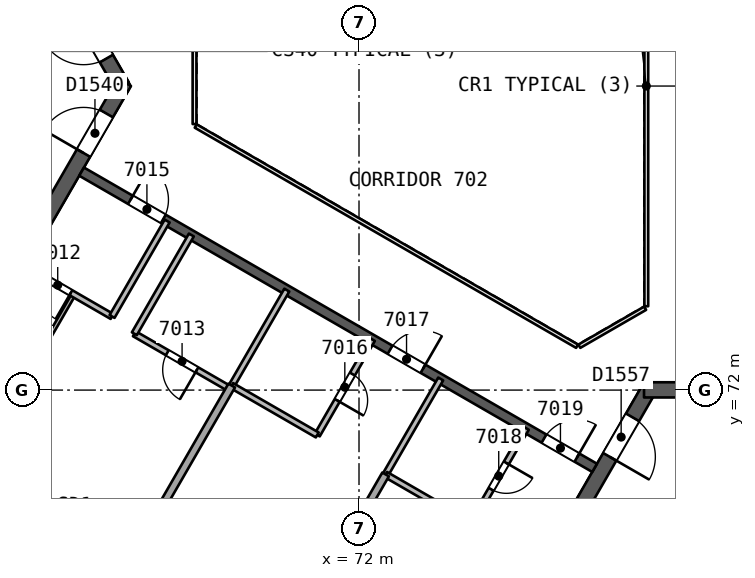
"""IFC4 building model, lengths in metres.
Left out: names, types, materials, properties, quantities, classifications, styles, units other than length and angle.
Written with IfcOpenShell. Run it as: python <this file> out.ifc"""

import sys

from ifc_helpers import new_model, si_unit, direction, frame, frame_2d, origin, place, context, subcontext, project, spatial, rectangle, extrude, element, fill, save


model = new_model("IFC4")
c1 = context("Model", 3, precision=1e-05, world=origin(), true_north=direction((0.0, 1.0)))
c2 = subcontext(c1, "Body", "Model", "MODEL_VIEW")
j1 = project(units=[si_unit("LENGTHUNIT", "METRE"), si_unit("PLANEANGLEUNIT", "RADIAN")], contexts=[c1])
p1 = place(None, origin())
s1 = spatial("IfcSite", under=j1, at=p1, CompositionType="ELEMENT")
p2 = place(p1, origin())
s2 = spatial("IfcBuilding", under=s1, at=p2, CompositionType="ELEMENT")
p3 = place(p2, frame((0.0, 0.0, 284.9)))
s3 = spatial("IfcBuildingStorey", under=s2, at=p3, CompositionType="ELEMENT", Elevation=284.9)
p4 = place(p3, frame((65.769, 80.0, 0.0), z_axis=(0.0, 0.0, 1.0), x_axis=(-0.50000177223, 0.866024380585, 0.0)))
e1 = element("IfcWall", 1, at=p4, inside=s3, PredefinedType="SHEAR", context=c2, shape_type="SweptSolid", body=[
    extrude(rectangle(XDim=10.265, YDim=0.4, at=frame_2d((5.132, 0.0))), origin(), (0.0, 0.0, 1.0), 3.7),
])
p5 = place(p4, frame((0.834, 0.0, 0.0)))
e2 = element("IfcOpeningElement", 2, at=p5, cuts=e1, PredefinedType="OPENING", context=c2, shape_type="SweptSolid", body=[
    extrude(rectangle(XDim=1.2, YDim=2.1, at=frame_2d((0.6, 1.05))), frame((0.0, 0.21, 0.0), z_axis=(0.0, -1.0, 0.0), x_axis=(1.0, 0.0, 0.0)), (0.0, 0.0, 1.0), 0.421),
])
p6 = place(p3, frame((60.737, 71.284, 0.0), z_axis=(0.0, 0.0, 1.0), x_axis=(0.50000547566, 0.866022242388, 0.0)))
e3 = element("IfcWall", 3, at=p6, inside=s3, PredefinedType="SHEAR", context=c2, shape_type="SweptSolid", body=[
    extrude(rectangle(XDim=10.18, YDim=0.4, at=frame_2d((5.09, 0.0))), origin(), (0.0, 0.0, 1.0), 3.7),
])
p7 = place(p6, frame((8.03, 0.0, 0.0)))
e4 = element("IfcOpeningElement", 4, at=p7, cuts=e3, PredefinedType="OPENING", context=c2, shape_type="SweptSolid", body=[
    extrude(rectangle(XDim=1.2, YDim=2.1, at=frame_2d((0.6, 1.05))), frame((0.0, 0.21, 0.0), z_axis=(0.0, -1.0, 0.0), x_axis=(1.0, 0.0, 0.0)), (0.0, 0.0, 1.0), 0.421),
])
p8 = place(p3, frame((79.615, 72.006, 0.0), z_axis=(0.0, 0.0, 1.0), x_axis=(-0.50000177223, -0.866024380585, 0.0)))
e5 = element("IfcWall", 5, at=p8, inside=s3, PredefinedType="SHEAR", context=c2, shape_type="SweptSolid", body=[
    extrude(rectangle(XDim=10.265, YDim=0.4, at=frame_2d((5.132, 0.0))), origin(), (0.0, 0.0, 1.0), 3.7),
])
p9 = place(p8, frame((0.834, 0.0, 0.0)))
e6 = element("IfcOpeningElement", 6, at=p9, cuts=e5, PredefinedType="OPENING", context=c2, shape_type="SweptSolid", body=[
    extrude(rectangle(XDim=1.2, YDim=2.1, at=frame_2d((0.6, 1.05))), frame((0.0, 0.21, 0.0), z_axis=(0.0, -1.0, 0.0), x_axis=(1.0, 0.0, 0.0)), (0.0, 0.0, 1.0), 0.421),
])
p10 = place(p3, frame((89.68, 72.006, 0.0), z_axis=(0.0, 0.0, 1.0), x_axis=(-1.0, 0.0, 0.0)))
e7 = element("IfcWall", 7, at=p10, inside=s3, PredefinedType="SHEAR", context=c2, shape_type="SweptSolid", body=[
    extrude(rectangle(XDim=10.18, YDim=0.4, at=frame_2d((5.09, 0.0))), origin(), (0.0, 0.0, 1.0), 3.7),
])
p11 = place(p10, frame((8.03, 0.0, 0.0)))
e8 = element("IfcOpeningElement", 8, at=p11, cuts=e7, PredefinedType="OPENING", context=c2, shape_type="SweptSolid", body=[
    extrude(rectangle(XDim=1.2, YDim=2.1, at=frame_2d((0.6, 1.05))), frame((0.0, 0.21, 0.0), z_axis=(0.0, -1.0, 0.0), x_axis=(1.0, 0.0, 0.0)), (0.0, 0.0, 1.0), 0.421),
])
p12 = place(p3, frame((64.7, 77.748, 0.0), z_axis=(0.0, 0.0, 1.0), x_axis=(0.866026492143, -0.499998114903, 0.0)))
e9 = element("IfcWall", 9, at=p12, inside=s3, PredefinedType="SHEAR", context=c2, shape_type="SweptSolid", body=[
    extrude(rectangle(XDim=15.588, YDim=0.25, at=frame_2d((7.794, 0.0))), origin(), (0.0, 0.0, 1.0), 3.3),
])
p13 = place(p12, frame((1.485, 0.0, 0.0)))
e10 = element("IfcOpeningElement", 10, at=p13, cuts=e9, PredefinedType="OPENING", context=c2, shape_type="SweptSolid", body=[
    extrude(rectangle(XDim=1.0, YDim=2.1, at=frame_2d((0.5, 1.05))), frame((0.0, 0.135, 0.0), z_axis=(0.0, -1.0, 0.0), x_axis=(1.0, 0.0, 0.0)), (0.0, 0.0, 1.0), 0.271),
])
p14 = place(p12, frame((9.374, 0.0, 0.0)))
e11 = element("IfcOpeningElement", 11, at=p14, cuts=e9, PredefinedType="OPENING", context=c2, shape_type="SweptSolid", body=[
    extrude(rectangle(XDim=1.0, YDim=2.1, at=frame_2d((0.5, 1.05))), frame((0.0, 0.135, 0.0), z_axis=(0.0, -1.0, 0.0), x_axis=(1.0, 0.0, 0.0)), (0.0, 0.0, 1.0), 0.271),
])
p15 = place(p12, frame((14.05, 0.0, 0.0)))
e12 = element("IfcOpeningElement", 12, at=p15, cuts=e9, PredefinedType="OPENING", context=c2, shape_type="SweptSolid", body=[
    extrude(rectangle(XDim=1.0, YDim=2.1, at=frame_2d((0.5, 1.05))), frame((0.0, 0.135, 0.0), z_axis=(0.0, -1.0, 0.0), x_axis=(1.0, 0.0, 0.0)), (0.0, 0.0, 1.0), 0.271),
])
p16 = place(p3, frame((61.39, 69.146, 0.0), z_axis=(0.0, 0.0, 1.0), x_axis=(0.499986136558, 0.866033407698, 0.0)))
e13 = element("IfcWall", 13, at=p16, inside=s3, PredefinedType="PARTITIONING", context=c2, shape_type="SweptSolid", body=[
    extrude(rectangle(XDim=6.225, YDim=0.1, at=frame_2d((3.112, 0.0))), origin(), (0.0, 0.0, 1.0), 3.3),
])
p17 = place(p16, frame((3.255, 0.0, 0.0)))
e14 = element("IfcOpeningElement", 14, at=p17, cuts=e13, PredefinedType="OPENING", context=c2, shape_type="SweptSolid", body=[
    extrude(rectangle(XDim=0.9, YDim=2.1, at=frame_2d((0.45, 1.05))), frame((0.0, 0.061, 0.0), z_axis=(0.0, -1.0, 0.0), x_axis=(1.0, 0.0, 0.0)), (0.0, 0.0, 1.0), 0.121),
])
p18 = place(p3, frame((65.502, 73.937, 0.0), z_axis=(0.0, 0.0, 1.0), x_axis=(-0.865994240961, 0.500053971709, 0.0)))
e15 = element("IfcWall", 15, at=p18, inside=s3, PredefinedType="PARTITIONING", context=c2, shape_type="SweptSolid", body=[
    extrude(rectangle(XDim=2.401, YDim=0.15, at=frame_2d((1.201, 0.0))), origin(), (0.0, 0.0, 1.0), 3.3),
])
p19 = place(p18, frame((1.251, 0.0, 0.0)))
e16 = element("IfcOpeningElement", 16, at=p19, cuts=e15, PredefinedType="OPENING", context=c2, shape_type="SweptSolid", body=[
    extrude(rectangle(XDim=0.8, YDim=2.1, at=frame_2d((0.4, 1.05))), frame((0.0, 0.085, 0.0), z_axis=(0.0, -1.0, 0.0), x_axis=(1.0, 0.0, 0.0)), (0.0, 0.0, 1.0), 0.171),
])
p20 = place(p3, frame((66.952, 76.448, 0.0), z_axis=(0.0, 0.0, 1.0), x_axis=(-0.499987231761, -0.866032775405, 0.0)))
e17 = element("IfcWall", 17, at=p20, inside=s3, PredefinedType="PARTITIONING", context=c2, shape_type="SweptSolid", body=[
    extrude(rectangle(XDim=2.9, YDim=0.15, at=frame_2d((1.45, 0.0))), origin(), (0.0, 0.0, 1.0), 3.3),
])
p21 = place(p3, frame((70.1, 74.631, 0.0), z_axis=(0.0, 0.0, 1.0), x_axis=(-0.499990139034, -0.866031096941, 0.0)))
e18 = element("IfcWall", 18, at=p21, inside=s3, PredefinedType="PARTITIONING", context=c2, shape_type="SweptSolid", body=[
    extrude(rectangle(XDim=3.0, YDim=0.15, at=frame_2d((1.5, 0.0))), origin(), (0.0, 0.0, 1.0), 3.3),
])
p22 = place(p3, frame((68.6, 72.032, 0.0), z_axis=(0.0, 0.0, 1.0), x_axis=(-0.865996321171, 0.50005036918, 0.0)))
e19 = element("IfcWall", 19, at=p22, inside=s3, PredefinedType="PARTITIONING", context=c2, shape_type="SweptSolid", body=[
    extrude(rectangle(XDim=2.9, YDim=0.15, at=frame_2d((1.45, 0.0))), origin(), (0.0, 0.0, 1.0), 3.3),
])
p23 = place(p22, frame((1.0, 0.0, 0.0)))
e20 = element("IfcOpeningElement", 20, at=p23, cuts=e19, PredefinedType="OPENING", context=c2, shape_type="SweptSolid", body=[
    extrude(rectangle(XDim=0.9, YDim=2.1, at=frame_2d((0.45, 1.05))), frame((0.0, 0.085, 0.0), z_axis=(0.0, -1.0, 0.0), x_axis=(1.0, 0.0, 0.0)), (0.0, 0.0, 1.0), 0.171),
])
p24 = place(p3, frame((66.089, 73.483, 0.0), z_axis=(0.0, 0.0, 1.0), x_axis=(0.50002537861, 0.866010750942, 0.0)))
e21 = element("IfcWall", 21, at=p24, inside=s3, PredefinedType="PARTITIONING", context=c2, shape_type="SweptSolid", body=[
    extrude(rectangle(XDim=3.0, YDim=0.15, at=frame_2d((1.5, 0.0))), origin(), (0.0, 0.0, 1.0), 3.3),
])
p25 = place(p3, frame((65.548, 66.746, 0.0), z_axis=(0.0, 0.0, 1.0), x_axis=(0.499985851886, 0.866033572048, 0.0)))
e22 = element("IfcWall", 22, at=p25, inside=s3, PredefinedType="PARTITIONING", context=c2, shape_type="SweptSolid", body=[
    extrude(rectangle(XDim=6.205, YDim=0.2, at=frame_2d((3.103, 0.0))), origin(), (0.0, 0.0, 1.0), 3.3),
])
p26 = place(p3, frame((72.352, 73.331, 0.0), z_axis=(0.0, 0.0, 1.0), x_axis=(-0.499987231761, -0.866032775405, 0.0)))
e23 = element("IfcWall", 23, at=p26, inside=s3, PredefinedType="PARTITIONING", context=c2, shape_type="SweptSolid", body=[
    extrude(rectangle(XDim=2.9, YDim=0.15, at=frame_2d((1.45, 0.0))), origin(), (0.0, 0.0, 1.0), 3.3),
])
p27 = place(p26, frame((1.05, 0.0, 0.0)))
e24 = element("IfcOpeningElement", 24, at=p27, cuts=e23, PredefinedType="OPENING", context=c2, shape_type="SweptSolid", body=[
    extrude(rectangle(XDim=0.8, YDim=2.1, at=frame_2d((0.4, 1.05))), frame((0.0, 0.085, 0.0), z_axis=(0.0, -1.0, 0.0), x_axis=(1.0, 0.0, 0.0)), (0.0, 0.0, 1.0), 0.171),
])
p28 = place(p3, frame((70.902, 70.819, 0.0), z_axis=(0.0, 0.0, 1.0), x_axis=(-0.866021400173, 0.500006934395, 0.0)))
e25 = element("IfcWall", 25, at=p28, inside=s3, PredefinedType="PARTITIONING", context=c2, shape_type="SweptSolid", body=[
    extrude(rectangle(XDim=2.6, YDim=0.15, at=frame_2d((1.3, 0.0))), origin(), (0.0, 0.0, 1.0), 3.3),
])
p29 = place(p3, frame((69.598, 64.407, 0.0), z_axis=(0.0, 0.0, 1.0), x_axis=(0.499985851886, 0.866033572048, 0.0)))
e26 = element("IfcWall", 26, at=p29, inside=s3, PredefinedType="PARTITIONING", context=c2, shape_type="SweptSolid", body=[
    extrude(rectangle(XDim=6.205, YDim=0.2, at=frame_2d((3.103, 0.0))), origin(), (0.0, 0.0, 1.0), 3.3),
])
p30 = place(p3, frame((72.7, 69.781, 0.0), z_axis=(0.0, 0.0, 1.0), x_axis=(0.499987231761, 0.866032775405, 0.0)))
e27 = element("IfcWall", 27, at=p30, inside=s3, PredefinedType="PARTITIONING", context=c2, shape_type="SweptSolid", body=[
    extrude(rectangle(XDim=2.9, YDim=0.15, at=frame_2d((1.45, 0.0))), origin(), (0.0, 0.0, 1.0), 3.3),
])
p31 = place(p3, frame((76.402, 70.992, 0.0), z_axis=(0.0, 0.0, 1.0), x_axis=(-0.499987231761, -0.866032775405, 0.0)))
e28 = element("IfcWall", 28, at=p31, inside=s3, PredefinedType="PARTITIONING", context=c2, shape_type="SweptSolid", body=[
    extrude(rectangle(XDim=2.9, YDim=0.15, at=frame_2d((1.45, 0.0))), origin(), (0.0, 0.0, 1.0), 3.3),
])
p32 = place(p31, frame((1.05, 0.0, 0.0)))
e29 = element("IfcOpeningElement", 29, at=p32, cuts=e28, PredefinedType="OPENING", context=c2, shape_type="SweptSolid", body=[
    extrude(rectangle(XDim=0.8, YDim=2.1, at=frame_2d((0.4, 1.05))), frame((0.0, 0.085, 0.0), z_axis=(0.0, -1.0, 0.0), x_axis=(1.0, 0.0, 0.0)), (0.0, 0.0, 1.0), 0.171),
])
p33 = place(p3, frame((74.952, 68.481, 0.0), z_axis=(0.0, 0.0, 1.0), x_axis=(-0.866021400173, 0.500006934395, 0.0)))
e30 = element("IfcWall", 30, at=p33, inside=s3, PredefinedType="PARTITIONING", context=c2, shape_type="SweptSolid", body=[
    extrude(rectangle(XDim=2.6, YDim=0.15, at=frame_2d((1.3, 0.0))), origin(), (0.0, 0.0, 1.0), 3.3),
])
p34 = place(p3, frame((87.188, 54.08, 0.0), z_axis=(0.0, 0.0, 1.0), x_axis=(-0.866024534676, 0.500001505337, 0.0)))
e31 = element("IfcWall", 31, at=p34, inside=s3, PredefinedType="SOLIDWALL", context=c2, shape_type="SweptSolid", body=[
    extrude(rectangle(XDim=47.03, YDim=0.3, at=frame_2d((23.515, 0.0))), origin(), (0.0, 0.0, 1.0), 3.3),
])
p35 = place(p34, frame((29.392, 0.0, 0.0)))
e32 = element("IfcOpeningElement", 32, at=p35, cuts=e31, PredefinedType="OPENING", context=c2, shape_type="SweptSolid", body=[
    extrude(rectangle(XDim=2.4, YDim=2.4, at=frame_2d((1.2, 1.2))), frame((0.0, 0.161, 0.0), z_axis=(0.0, -1.0, 0.0), x_axis=(1.0, 0.0, 0.0)), (0.0, 0.0, 1.0), 0.321),
])
p36 = place(p34, frame((26.274, 0.0, 0.0)))
e33 = element("IfcOpeningElement", 33, at=p36, cuts=e31, PredefinedType="OPENING", context=c2, shape_type="SweptSolid", body=[
    extrude(rectangle(XDim=2.4, YDim=2.4, at=frame_2d((1.2, 1.2))), frame((0.0, 0.161, 0.0), z_axis=(0.0, -1.0, 0.0), x_axis=(1.0, 0.0, 0.0)), (0.0, 0.0, 1.0), 0.321),
])
p37 = place(p34, frame((16.859, 0.0, 0.0)))
e34 = element("IfcOpeningElement", 34, at=p37, cuts=e31, PredefinedType="OPENING", context=c2, shape_type="SweptSolid", body=[
    extrude(rectangle(XDim=2.4, YDim=2.4, at=frame_2d((1.2, 1.2))), frame((0.0, 0.161, 0.0), z_axis=(0.0, -1.0, 0.0), x_axis=(1.0, 0.0, 0.0)), (0.0, 0.0, 1.0), 0.321),
])
p38 = place(p34, frame((21.536, 0.0, 0.0)))
e35 = element("IfcOpeningElement", 35, at=p38, cuts=e31, PredefinedType="OPENING", context=c2, shape_type="SweptSolid", body=[
    extrude(rectangle(XDim=2.4, YDim=2.4, at=frame_2d((1.2, 1.2))), frame((0.0, 0.161, 0.0), z_axis=(0.0, -1.0, 0.0), x_axis=(1.0, 0.0, 0.0)), (0.0, 0.0, 1.0), 0.321),
])
p39 = place(p3, frame((77.135, 64.952, 0.0), z_axis=(0.0, 0.0, 1.0), x_axis=(0.866031916153, 0.499988720078, 0.0)))
e36 = element("IfcWall", 36, at=p39, inside=s3, PredefinedType="SOLIDWALL", context=c2, shape_type="SweptSolid", body=[
    extrude(rectangle(XDim=11.35, YDim=0.2, at=frame_2d((5.675, 0.0))), origin(), (0.0, 0.0, 1.0), 3.3),
])
p40 = place(p39, frame((2.875, 0.0, 0.0)))
e37 = element("IfcOpeningElement", 37, at=p40, cuts=e36, PredefinedType="OPENING", context=c2, shape_type="SweptSolid", body=[
    extrude(rectangle(XDim=1.1, YDim=2.1, at=frame_2d((0.55, 1.05))), frame((0.0, 0.11, 0.0), z_axis=(0.0, -1.0, 0.0), x_axis=(1.0, 0.0, 0.0)), (0.0, 0.0, 1.0), 0.221),
])
p41 = place(p39, frame((5.125, 0.0, 0.0)))
e38 = element("IfcOpeningElement", 38, at=p41, cuts=e36, PredefinedType="OPENING", context=c2, shape_type="SweptSolid", body=[
    extrude(rectangle(XDim=1.1, YDim=2.1, at=frame_2d((0.55, 1.05))), frame((0.0, 0.11, 0.0), z_axis=(0.0, -1.0, 0.0), x_axis=(1.0, 0.0, 0.0)), (0.0, 0.0, 1.0), 0.221),
])
p42 = place(p39, frame((7.375, 0.0, 0.0)))
e39 = element("IfcOpeningElement", 39, at=p42, cuts=e36, PredefinedType="OPENING", context=c2, shape_type="SweptSolid", body=[
    extrude(rectangle(XDim=1.1, YDim=2.1, at=frame_2d((0.55, 1.05))), frame((0.0, 0.11, 0.0), z_axis=(0.0, -1.0, 0.0), x_axis=(1.0, 0.0, 0.0)), (0.0, 0.0, 1.0), 0.221),
])
p43 = place(p3, frame((79.56, 74.206, 0.0), z_axis=(0.0, 0.0, 1.0), x_axis=(0.0, 1.0, 0.0)))
e40 = element("IfcWall", 40, at=p43, inside=s3, PredefinedType="PARTITIONING", context=c2, shape_type="SweptSolid", body=[
    extrude(rectangle(XDim=11.588, YDim=0.1, at=frame_2d((5.794, 0.0))), origin(), (0.0, 0.0, 1.0), 3.3),
])
p44 = place(p3, frame((67.672, 81.0, 0.0), z_axis=(0.0, 0.0, 1.0), x_axis=(0.0, -1.0, 0.0)))
e41 = element("IfcWall", 41, at=p44, inside=s3, PredefinedType="PARTITIONING", context=c2, shape_type="SweptSolid", body=[
    extrude(rectangle(XDim=2.0, YDim=0.1, at=frame_2d((1.0, 0.0))), origin(), (0.0, 0.0, 1.0), 3.3),
])
p45 = place(p3, frame((67.702, 78.948, 0.0), z_axis=(0.0, 0.0, 1.0), x_axis=(0.866026658274, -0.499997827154, 0.0)))
e42 = element("IfcWall", 42, at=p45, inside=s3, PredefinedType="PARTITIONING", context=c2, shape_type="SweptSolid", body=[
    extrude(rectangle(XDim=11.588, YDim=0.1, at=frame_2d((5.794, 0.0))), origin(), (0.0, 0.0, 1.0), 3.3),
])
p46 = place(p3, frame((77.798, 73.154, 0.0), z_axis=(0.0, 0.0, 1.0), x_axis=(0.866041268327, 0.499972520799, 0.0)))
e43 = element("IfcWall", 43, at=p46, inside=s3, PredefinedType="PARTITIONING", context=c2, shape_type="SweptSolid", body=[
    extrude(rectangle(XDim=2.0, YDim=0.1, at=frame_2d((1.0, 0.0))), origin(), (0.0, 0.0, 1.0), 3.3),
])
p47 = place(p19, origin())
e44 = element("IfcDoor", 44, at=p47, inside=s3, OperationType="SINGLE_SWING_LEFT", PredefinedType="NOTDEFINED", context=c2, shape_type="SweptSolid", body=[
    extrude(rectangle(XDim=0.8, YDim=2.1, at=frame_2d((0.4, 1.05))), frame((0.0, 0.025, 0.0), z_axis=(0.0, -1.0, 0.0), x_axis=(1.0, 0.0, 0.0)), (0.0, 0.0, 1.0), 0.05),
])
fill(e16, e44)
p48 = place(p23, origin())
e45 = element("IfcDoor", 45, at=p48, inside=s3, OperationType="SINGLE_SWING_LEFT", PredefinedType="NOTDEFINED", context=c2, shape_type="SweptSolid", body=[
    extrude(rectangle(XDim=0.9, YDim=2.1, at=frame_2d((0.45, 1.05))), frame((0.0, 0.025, 0.0), z_axis=(0.0, -1.0, 0.0), x_axis=(1.0, 0.0, 0.0)), (0.0, 0.0, 1.0), 0.05),
])
fill(e20, e45)
p49 = place(p13, origin())
e46 = element("IfcDoor", 46, at=p49, inside=s3, OperationType="SINGLE_SWING_LEFT", PredefinedType="NOTDEFINED", context=c2, shape_type="SweptSolid", body=[
    extrude(rectangle(XDim=1.0, YDim=2.1, at=frame_2d((0.5, 1.05))), frame((0.0, 0.025, 0.0), z_axis=(0.0, -1.0, 0.0), x_axis=(1.0, 0.0, 0.0)), (0.0, 0.0, 1.0), 0.05),
])
fill(e10, e46)
p50 = place(p27, origin())
e47 = element("IfcDoor", 47, at=p50, inside=s3, OperationType="SINGLE_SWING_RIGHT", PredefinedType="NOTDEFINED", context=c2, shape_type="SweptSolid", body=[
    extrude(rectangle(XDim=0.8, YDim=2.1, at=frame_2d((0.4, 1.05))), frame((0.0, 0.025, 0.0), z_axis=(0.0, -1.0, 0.0), x_axis=(1.0, 0.0, 0.0)), (0.0, 0.0, 1.0), 0.05),
])
fill(e24, e47)
p51 = place(p14, origin())
e48 = element("IfcDoor", 48, at=p51, inside=s3, OperationType="SINGLE_SWING_RIGHT", PredefinedType="NOTDEFINED", context=c2, shape_type="SweptSolid", body=[
    extrude(rectangle(XDim=1.0, YDim=2.1, at=frame_2d((0.5, 1.05))), frame((0.0, 0.025, 0.0), z_axis=(0.0, -1.0, 0.0), x_axis=(1.0, 0.0, 0.0)), (0.0, 0.0, 1.0), 0.05),
])
fill(e11, e48)
p52 = place(p32, origin())
e49 = element("IfcDoor", 49, at=p52, inside=s3, OperationType="SINGLE_SWING_LEFT", PredefinedType="NOTDEFINED", context=c2, shape_type="SweptSolid", body=[
    extrude(rectangle(XDim=0.8, YDim=2.1, at=frame_2d((0.4, 1.05))), frame((0.0, 0.025, 0.0), z_axis=(0.0, -1.0, 0.0), x_axis=(1.0, 0.0, 0.0)), (0.0, 0.0, 1.0), 0.05),
])
fill(e29, e49)
p53 = place(p15, origin())
e50 = element("IfcDoor", 50, at=p53, inside=s3, OperationType="SINGLE_SWING_RIGHT", PredefinedType="NOTDEFINED", context=c2, shape_type="SweptSolid", body=[
    extrude(rectangle(XDim=1.0, YDim=2.1, at=frame_2d((0.5, 1.05))), frame((0.0, 0.025, 0.0), z_axis=(0.0, -1.0, 0.0), x_axis=(1.0, 0.0, 0.0)), (0.0, 0.0, 1.0), 0.05),
])
fill(e12, e50)
p54 = place(p5, origin())
e51 = element("IfcDoor", 51, at=p54, inside=s3, OperationType="SINGLE_SWING_RIGHT", PredefinedType="NOTDEFINED", context=c2, shape_type="SweptSolid", body=[
    extrude(rectangle(XDim=1.2, YDim=2.1, at=frame_2d((0.6, 1.05))), frame((0.0, 0.025, 0.0), z_axis=(0.0, -1.0, 0.0), x_axis=(1.0, 0.0, 0.0)), (0.0, 0.0, 1.0), 0.05),
])
fill(e2, e51)
p55 = place(p7, origin())
e52 = element("IfcDoor", 52, at=p55, inside=s3, OperationType="SINGLE_SWING_LEFT", PredefinedType="NOTDEFINED", context=c2, shape_type="SweptSolid", body=[
    extrude(rectangle(XDim=1.2, YDim=2.1, at=frame_2d((0.6, 1.05))), frame((0.0, 0.025, 0.0), z_axis=(0.0, -1.0, 0.0), x_axis=(1.0, 0.0, 0.0)), (0.0, 0.0, 1.0), 0.05),
])
fill(e4, e52)
p56 = place(p9, origin())
e53 = element("IfcDoor", 53, at=p56, inside=s3, OperationType="SINGLE_SWING_RIGHT", PredefinedType="NOTDEFINED", context=c2, shape_type="SweptSolid", body=[
    extrude(rectangle(XDim=1.2, YDim=2.1, at=frame_2d((0.6, 1.05))), frame((0.0, 0.025, 0.0), z_axis=(0.0, -1.0, 0.0), x_axis=(1.0, 0.0, 0.0)), (0.0, 0.0, 1.0), 0.05),
])
fill(e6, e53)
save(model, sys.argv[1])
